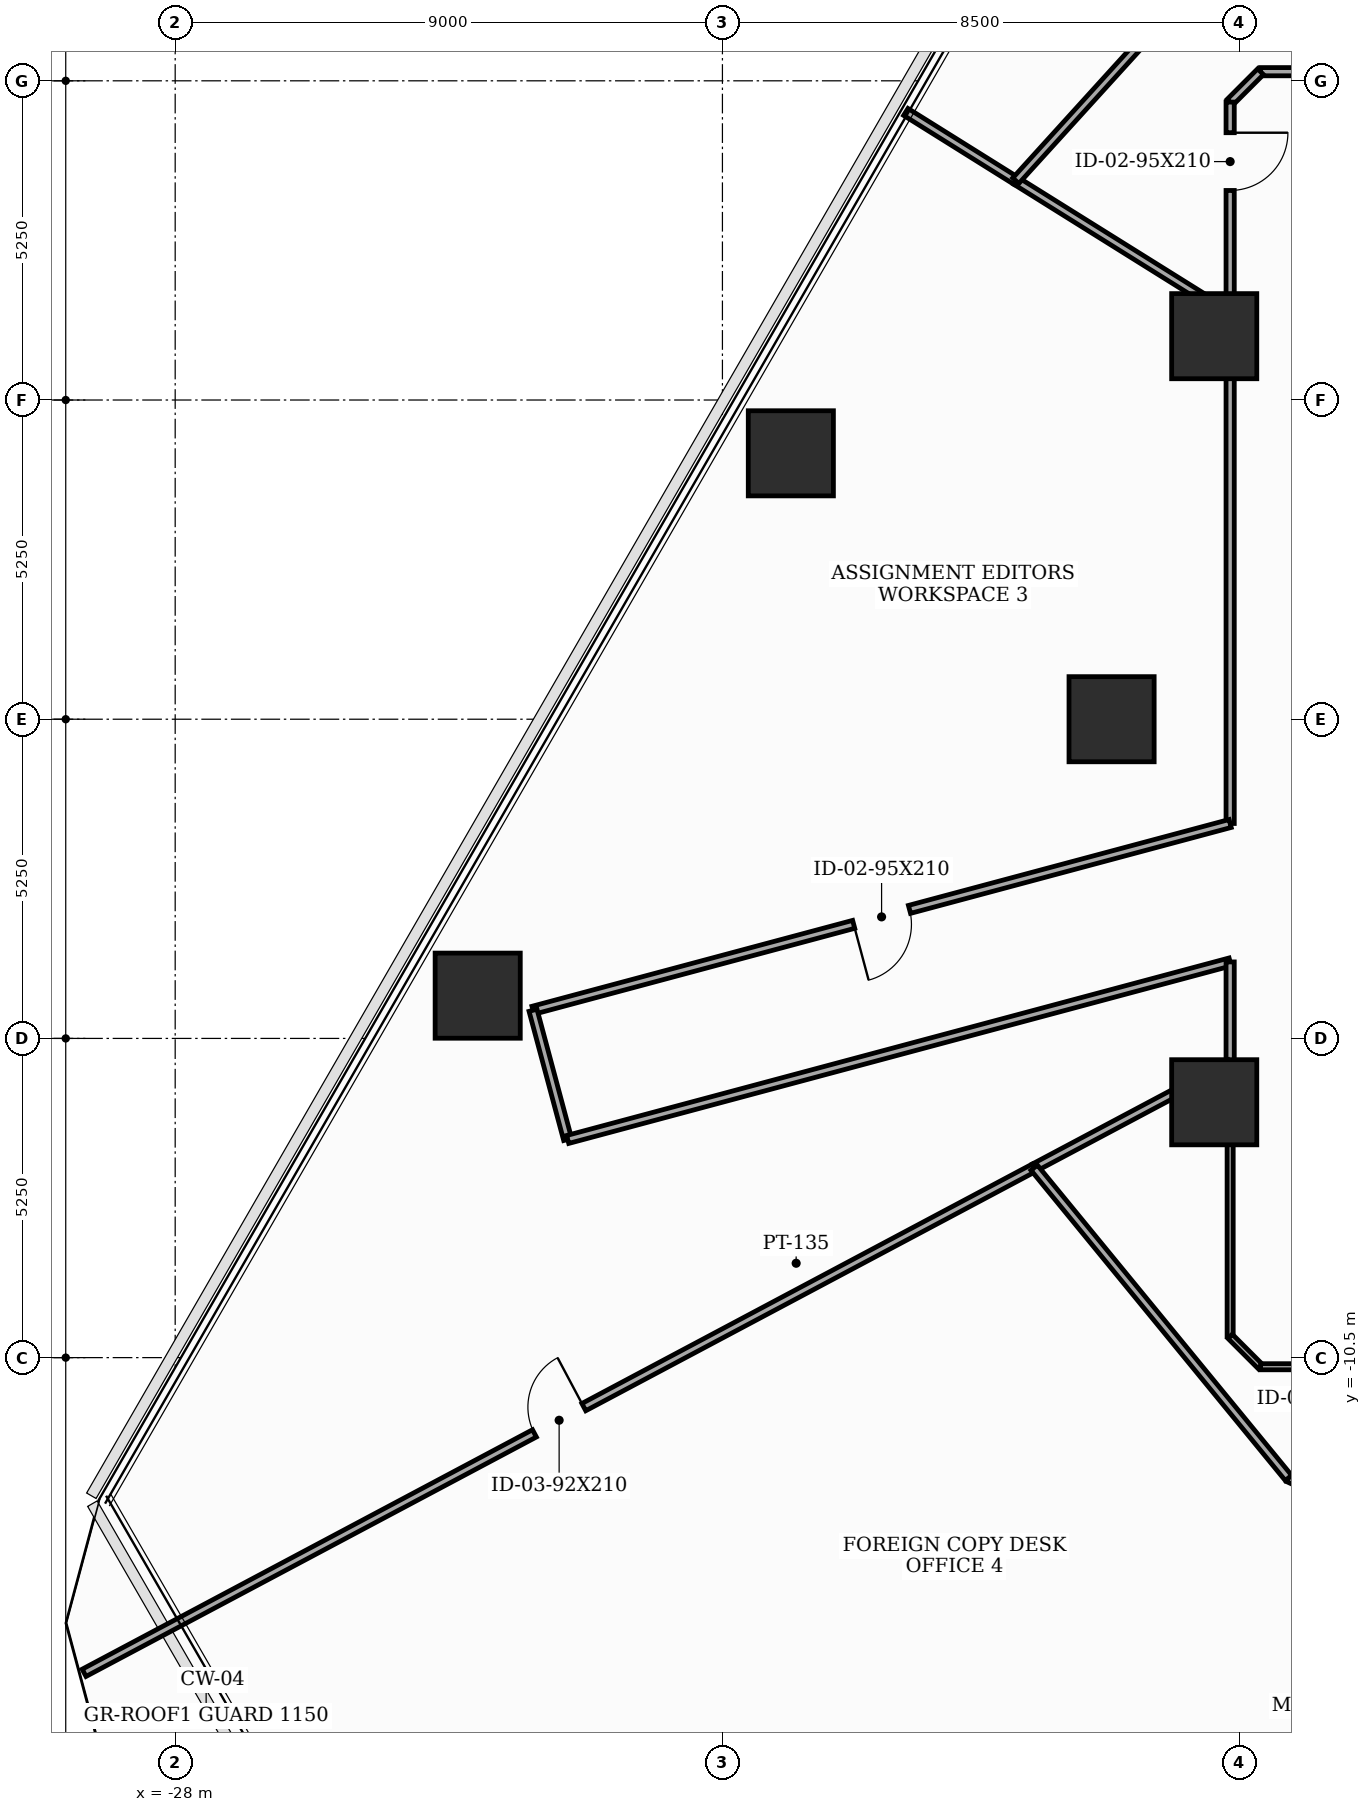
"""IFC4 building model, lengths in metres.
Left out: names, types, materials, properties, quantities, classifications, styles, units other than length and angle.
Written with IfcOpenShell. Run it as: python <this file> out.ifc"""

import sys

from ifc_helpers import new_model, si_unit, direction, frame, frame_2d, origin, origin_2d, place, context, subcontext, project, spatial, rectangle, extrude, element, fill, save


model = new_model("IFC4")
c1 = context("Model", 3, precision=1e-05, world=origin(), true_north=direction((0.0, 1.0)))
c2 = subcontext(c1, "Body", "Model", "MODEL_VIEW")
j1 = project(units=[si_unit("LENGTHUNIT", "METRE"), si_unit("PLANEANGLEUNIT", "RADIAN")], contexts=[c1])
p1 = place(None, origin())
s1 = spatial("IfcSite", under=j1, at=p1, CompositionType="ELEMENT")
p2 = place(p1, origin())
s2 = spatial("IfcBuilding", under=s1, at=p2, CompositionType="ELEMENT")
p3 = place(p2, frame((0.0, 0.0, 33.4)))
s3 = spatial("IfcBuildingStorey", under=s2, at=p3, CompositionType="ELEMENT", Elevation=33.4)
for number, where, z_axis, x_axis in (
    (1, (-10.912, 6.3, 0.0), (0.0, 0.0, 1.0), (1.0, 0.0, 0.0)),
    (2, (-12.6, 0.0, 0.0), (0.0, 0.0, 1.0), (1.0, 0.0, 0.0)),
    (3, (-10.912, -6.3, 0.0), (0.0, 0.0, 1.0), (1.0, 0.0, 0.0)),
    (4, (-17.875, 4.373, 0.0), (0.0, 0.0, 1.0), (1.0, 0.0, 0.0)),
    (5, (-23.025, -4.547, 0.0), (0.0, 0.0, 1.0), (1.0, 0.0, 0.0)),
):
    element("IfcColumn", number, at=place(p3, frame(where, z_axis=z_axis, x_axis=x_axis)), inside=s3, PredefinedType="COLUMN", context=c2, shape_type="SweptSolid", body=[
        extrude(rectangle(XDim=1.4, YDim=1.4, at=origin_2d()), origin(), (0.0, 0.0, 1.0), 3.7),
    ])
p4 = place(p3, frame((-10.65, 6.655, 0.0), z_axis=(0.0, 0.0, 1.0), x_axis=(0.0, -1.0, 0.0)))
e6 = element("IfcWall", 6, at=p4, inside=s3, PredefinedType="PARTITIONING", context=c2, shape_type="SweptSolid", body=[
    extrude(rectangle(XDim=8.37, YDim=0.135, at=frame_2d((4.185, 0.0))), origin(), (0.0, 0.0, 1.0), 2.785),
])
p5 = place(p3, frame((-10.65, -1.715, 0.0), z_axis=(0.0, 0.0, 1.0), x_axis=(-0.965926659449, -0.258815935688, 0.0)))
e7 = element("IfcWall", 7, at=p5, inside=s3, PredefinedType="PARTITIONING", context=c2, shape_type="SweptSolid", body=[
    extrude(rectangle(XDim=11.87, YDim=0.135, at=frame_2d((5.935, 0.0))), origin(), (0.0, 0.0, 1.0), 2.785),
])
p6 = place(p5, frame((5.46, 0.0, 0.0)))
e8 = element("IfcOpeningElement", 8, at=p6, cuts=e7, PredefinedType="OPENING", context=c2, shape_type="SweptSolid", body=[
    extrude(rectangle(XDim=0.95, YDim=2.1, at=frame_2d((0.475, 1.05))), frame((0.0, 0.077, 0.0), z_axis=(0.0, -1.0, 0.0), x_axis=(1.0, 0.0, 0.0)), (0.0, 0.0, 1.0), 0.155),
])
p7 = place(p3, frame((-22.115, -4.787, 0.0), z_axis=(0.0, 0.0, 1.0), x_axis=(0.259105843213, -0.965848933329, 0.0)))
e9 = element("IfcWall", 9, at=p7, inside=s3, PredefinedType="PARTITIONING", context=c2, shape_type="SweptSolid", body=[
    extrude(rectangle(XDim=2.2, YDim=0.135, at=frame_2d((1.1, 0.0))), origin(), (0.0, 0.0, 1.0), 2.935),
])
p8 = place(p3, frame((-21.545, -6.912, 0.0), z_axis=(0.0, 0.0, 1.0), x_axis=(0.965906888357, 0.258889712088, 0.0)))
e10 = element("IfcWall", 10, at=p8, inside=s3, PredefinedType="PARTITIONING", context=c2, shape_type="SweptSolid", body=[
    extrude(rectangle(XDim=11.28, YDim=0.135, at=frame_2d((5.64, 0.0))), origin(), (0.0, 0.0, 1.0), 2.785),
])
p9 = place(p3, frame((-10.65, -3.992, 0.0), z_axis=(0.0, 0.0, 1.0), x_axis=(0.0, -1.0, 0.0)))
e11 = element("IfcWall", 11, at=p9, inside=s3, PredefinedType="PARTITIONING", context=c2, shape_type="SweptSolid", body=[
    extrude(rectangle(XDim=1.671, YDim=0.135, at=frame_2d((0.835, 0.0))), origin(), (0.0, 0.0, 1.0), 3.5),
])
p10 = place(p3, frame((-10.65, -5.663, 0.0), z_axis=(0.0, 0.0, 1.0), x_axis=(0.0, -1.0, 0.0)))
e12 = element("IfcWall", 12, at=p10, inside=s3, PredefinedType="MOVABLE", context=c2, shape_type="SweptSolid", body=[
    extrude(rectangle(XDim=4.487, YDim=0.1, at=frame_2d((2.243, 0.0))), origin(), (0.0, 0.0, 1.0), 2.785),
])
p11 = place(p3, frame((-10.65, -10.15, 0.0), z_axis=(0.0, 0.0, 1.0), x_axis=(0.707106781187, -0.707106781187, 0.0)))
e13 = element("IfcWall", 13, at=p11, inside=s3, PredefinedType="MOVABLE", context=c2, shape_type="SweptSolid", body=[
    extrude(rectangle(XDim=0.707, YDim=0.1, at=frame_2d((0.354, 0.0))), origin(), (0.0, 0.0, 1.0), 3.5),
])
p12 = place(p3, frame((-10.15, -10.65, 0.0), z_axis=(0.0, 0.0, 1.0), x_axis=(1.0, 0.0, 0.0)))
e14 = element("IfcWall", 14, at=p12, inside=s3, PredefinedType="MOVABLE", context=c2, shape_type="SweptSolid", body=[
    extrude(rectangle(XDim=5.3, YDim=0.1, at=frame_2d((2.65, 0.0))), origin(), (0.0, 0.0, 1.0), 2.785),
])
p13 = place(p12, frame((0.6, 0.0, 0.0)))
e15 = element("IfcOpeningElement", 15, at=p13, cuts=e14, PredefinedType="OPENING", context=c2, shape_type="SweptSolid", body=[
    extrude(rectangle(XDim=0.92, YDim=2.1, at=frame_2d((0.46, 1.05))), frame((0.0, 0.06, 0.0), z_axis=(0.0, -1.0, 0.0), x_axis=(1.0, 0.0, 0.0)), (0.0, 0.0, 1.0), 0.12),
])
p14 = place(p3, frame((-2.655, 10.65, 0.0), z_axis=(0.0, 0.0, 1.0), x_axis=(-1.0, 0.0, 0.0)))
e16 = element("IfcWall", 16, at=p14, inside=s3, PredefinedType="PARTITIONING", context=c2, shape_type="SweptSolid", body=[
    extrude(rectangle(XDim=7.495, YDim=0.135, at=frame_2d((3.748, 0.0))), origin(), (0.0, 0.0, 1.0), 2.685),
])
p15 = place(p3, frame((-10.15, 10.65, 0.0), z_axis=(0.0, 0.0, 1.0), x_axis=(-0.707106781187, -0.707106781187, 0.0)))
e17 = element("IfcWall", 17, at=p15, inside=s3, PredefinedType="PARTITIONING", context=c2, shape_type="SweptSolid", body=[
    extrude(rectangle(XDim=0.707, YDim=0.135, at=frame_2d((0.354, 0.0))), origin(), (0.0, 0.0, 1.0), 3.5),
])
p16 = place(p3, frame((-10.65, 10.15, 0.0), z_axis=(0.0, 0.0, 1.0), x_axis=(0.0, -1.0, 0.0)))
e18 = element("IfcWall", 18, at=p16, inside=s3, PredefinedType="PARTITIONING", context=c2, shape_type="SweptSolid", body=[
    extrude(rectangle(XDim=3.495, YDim=0.135, at=frame_2d((1.748, 0.0))), origin(), (0.0, 0.0, 1.0), 2.785),
])
p17 = place(p16, frame((0.504, 0.0, 0.0)))
e19 = element("IfcOpeningElement", 19, at=p17, cuts=e18, PredefinedType="OPENING", context=c2, shape_type="SweptSolid", body=[
    extrude(rectangle(XDim=0.95, YDim=2.1, at=frame_2d((0.475, 1.05))), frame((0.0, 0.077, 0.0), z_axis=(0.0, -1.0, 0.0), x_axis=(1.0, 0.0, 0.0)), (0.0, 0.0, 1.0), 0.155),
])
p18 = place(p3, frame((-29.498, -15.684, 0.0), z_axis=(0.0, 0.0, 1.0), x_axis=(0.882944182352, 0.46947797696, 0.0)))
e20 = element("IfcWall", 20, at=p18, inside=s3, PredefinedType="PARTITIONING", context=c2, shape_type="SweptSolid", body=[
    extrude(rectangle(XDim=17.697, YDim=0.135, at=frame_2d((8.848, 0.0))), origin(), (0.0, 0.0, 1.0), 2.935),
])
p19 = place(p18, frame((8.388, 0.0, 0.0)))
e21 = element("IfcOpeningElement", 21, at=p19, cuts=e20, PredefinedType="OPENING", context=c2, shape_type="SweptSolid", body=[
    extrude(rectangle(XDim=0.92, YDim=2.1, at=frame_2d((0.46, 1.05))), frame((0.0, 0.077, 0.0), z_axis=(0.0, -1.0, 0.0), x_axis=(1.0, 0.0, 0.0)), (0.0, 0.0, 1.0), 0.155),
])
p20 = place(p3, frame((-13.873, -7.376, 0.0), z_axis=(0.0, 0.0, 1.0), x_axis=(0.883048160598, 0.469282373486, 0.0)))
e22 = element("IfcWall", 22, at=p20, inside=s3, PredefinedType="PARTITIONING", context=c2, shape_type="SweptSolid", body=[
    extrude(rectangle(XDim=3.65, YDim=0.135, at=frame_2d((1.825, 0.0))), origin(), (0.0, 0.0, 1.0), 2.785),
])
p21 = place(p3, frame((-14.175, 8.857, 0.0), z_axis=(0.0, 0.0, 1.0), x_axis=(-0.847856855063, 0.530225191142, 0.0)))
e23 = element("IfcWall", 23, at=p21, inside=s3, PredefinedType="PARTITIONING", context=c2, shape_type="SweptSolid", body=[
    extrude(rectangle(XDim=2.134, YDim=0.135, at=frame_2d((1.067, 0.0))), origin(), (0.0, 0.0, 1.0), 2.935),
])
p22 = place(p3, frame((-10.65, 6.655, 0.0), z_axis=(0.0, 0.0, 1.0), x_axis=(-0.848140172493, 0.529771882798, 0.0)))
e24 = element("IfcWall", 24, at=p22, inside=s3, PredefinedType="PARTITIONING", context=c2, shape_type="SweptSolid", body=[
    extrude(rectangle(XDim=4.156, YDim=0.135, at=frame_2d((2.078, 0.0))), origin(), (0.0, 0.0, 1.0), 2.785),
])
p23 = place(p3, frame((-3.33, -15.445, 0.0), z_axis=(0.0, 0.0, 1.0), x_axis=(-0.90631018164, 0.422613126458, 0.0)))
e25 = element("IfcWall", 25, at=p23, inside=s3, PredefinedType="PARTITIONING", context=c2, shape_type="SweptSolid", body=[
    extrude(rectangle(XDim=7.018, YDim=0.135, at=frame_2d((3.509, 0.0))), origin(), (0.0, 0.0, 1.0), 2.685),
])
p24 = place(p3, frame((-9.691, -12.479, 0.0), z_axis=(0.0, 0.0, 1.0), x_axis=(-0.633866270814, 0.773442661562, 0.0)))
e26 = element("IfcWall", 26, at=p24, inside=s3, PredefinedType="PARTITIONING", context=c2, shape_type="SweptSolid", body=[
    extrude(rectangle(XDim=6.598, YDim=0.135, at=frame_2d((3.299, 0.0))), origin(), (0.0, 0.0, 1.0), 3.5),
])
p25 = place(p3, frame((-14.175, 8.857, 0.0), z_axis=(0.0, 0.0, 1.0), x_axis=(0.672355423095, 0.740228468133, 0.0)))
e27 = element("IfcWall", 27, at=p25, inside=s3, PredefinedType="PARTITIONING", context=c2, shape_type="SweptSolid", body=[
    extrude(rectangle(XDim=6.396, YDim=0.135, at=frame_2d((3.198, 0.0))), origin(), (0.0, 0.0, 1.0), 2.685),
])
p26 = place(p6, origin())
e28 = element("IfcDoor", 28, at=p26, inside=s3, OperationType="SINGLE_SWING_RIGHT", PredefinedType="DOOR", context=c2, shape_type="SweptSolid", body=[
    extrude(rectangle(XDim=0.95, YDim=2.1, at=frame_2d((0.475, 1.05))), frame((0.0, 0.025, 0.0), z_axis=(0.0, -1.0, 0.0), x_axis=(1.0, 0.0, 0.0)), (0.0, 0.0, 1.0), 0.05),
])
fill(e8, e28)
p27 = place(p17, origin())
e29 = element("IfcDoor", 29, at=p27, inside=s3, OperationType="SINGLE_SWING_LEFT", PredefinedType="DOOR", context=c2, shape_type="SweptSolid", body=[
    extrude(rectangle(XDim=0.95, YDim=2.1, at=frame_2d((0.475, 1.05))), frame((0.0, 0.025, 0.0), z_axis=(0.0, -1.0, 0.0), x_axis=(1.0, 0.0, 0.0)), (0.0, 0.0, 1.0), 0.05),
])
fill(e19, e29)
p28 = place(p19, origin())
e30 = element("IfcDoor", 30, at=p28, inside=s3, OperationType="SINGLE_SWING_RIGHT", PredefinedType="DOOR", context=c2, shape_type="SweptSolid", body=[
    extrude(rectangle(XDim=0.92, YDim=2.1, at=frame_2d((0.46, 1.05))), frame((0.0, 0.025, 0.0), z_axis=(0.0, -1.0, 0.0), x_axis=(1.0, 0.0, 0.0)), (0.0, 0.0, 1.0), 0.05),
])
fill(e21, e30)
save(model, sys.argv[1])
